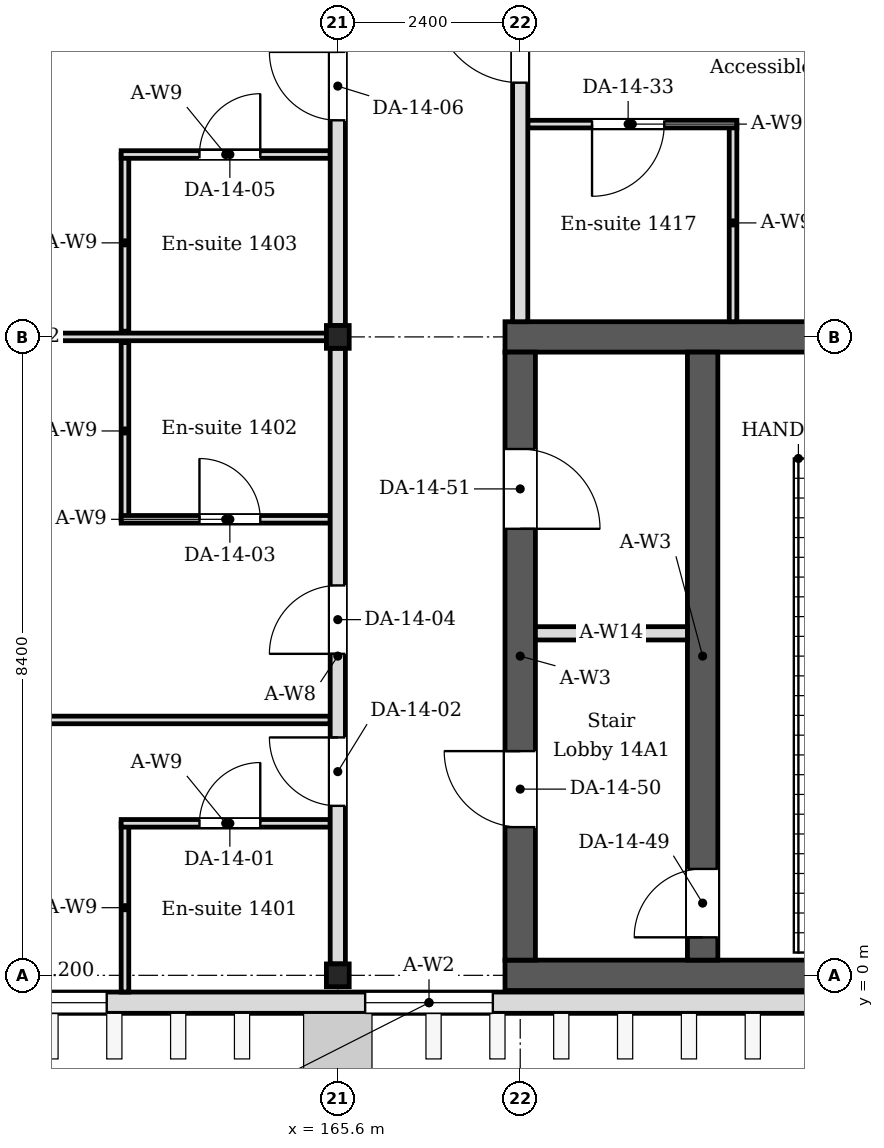
"""IFC4 building model, lengths in metres.
Left out: names, types, materials, properties, quantities, classifications, styles, units other than length and angle.
Written with IfcOpenShell. Run it as: python <this file> out.ifc"""

import sys

from ifc_helpers import new_model, si_unit, direction, frame, frame_2d, origin, origin_2d, place, context, subcontext, project, spatial, rectangle, i_section, extrude, element, fill, save


model = new_model("IFC4")
c1 = context("Model", 3, precision=1e-05, world=origin(), true_north=direction((0.0, 1.0)))
c2 = subcontext(c1, "Body", "Model", "MODEL_VIEW")
j1 = project(units=[si_unit("LENGTHUNIT", "METRE"), si_unit("PLANEANGLEUNIT", "RADIAN")], contexts=[c1])
p1 = place(None, origin())
s1 = spatial("IfcSite", under=j1, at=p1, CompositionType="ELEMENT")
p2 = place(p1, origin())
s2 = spatial("IfcBuilding", under=s1, at=p2, CompositionType="ELEMENT")
p3 = place(p2, frame((0.0, 0.0, 60.6)))
s3 = spatial("IfcBuildingStorey", under=s2, at=p3, CompositionType="ELEMENT", Elevation=60.6)
for number, where, z_axis, x_axis in (
    (1, (165.6, 0.0, 0.0), (0.0, 0.0, 1.0), (1.0, 0.0, 0.0)),
    (2, (165.6, 8.4, 0.0), (0.0, 0.0, 1.0), (1.0, 0.0, 0.0)),
):
    element("IfcColumn", number, at=place(p3, frame(where, z_axis=z_axis, x_axis=x_axis)), inside=s3, PredefinedType="COLUMN", context=c2, shape_type="SweptSolid", body=[
        extrude(i_section(OverallWidth=0.3, OverallDepth=0.3, WebThickness=0.01, FlangeThickness=0.015, FilletRadius=0.013, at=origin_2d()), origin(), (0.0, 0.0, 1.0), 4.2),
    ])
for number, where, z_axis, x_axis in (
    (3, (167.8, 0.0, 0.0), (0.0, 0.0, 1.0), (1.0, 0.0, 0.0)),
    (4, (167.8, 8.4, 0.0), (0.0, 0.0, 1.0), (1.0, 0.0, 0.0)),
):
    element("IfcWall", number, at=place(p3, frame(where, z_axis=z_axis, x_axis=x_axis)), inside=s3, PredefinedType="SOLIDWALL", context=c2, shape_type="SweptSolid", body=[
        extrude(rectangle(XDim=8.8, YDim=0.4, at=frame_2d((4.4, 0.0))), origin(), (0.0, 0.0, 1.0), 4.05),
    ])
p4 = place(p3, frame((168.0, 0.2, 0.0), z_axis=(0.0, 0.0, 1.0), x_axis=(0.0, 1.0, 0.0)))
e5 = element("IfcWall", 5, at=p4, inside=s3, PredefinedType="SOLIDWALL", context=c2, shape_type="SweptSolid", body=[
    extrude(rectangle(XDim=8.0, YDim=0.4, at=frame_2d((4.0, 0.0))), origin(), (0.0, 0.0, 1.0), 4.05),
])
p5 = place(p4, frame((1.75, 0.0, 0.0)))
e6 = element("IfcOpeningElement", 6, at=p5, cuts=e5, PredefinedType="OPENING", context=c2, shape_type="SweptSolid", body=[
    extrude(rectangle(XDim=1.0, YDim=2.1, at=frame_2d((0.5, 1.05))), frame((0.0, 0.21, 0.0), z_axis=(0.0, -1.0, 0.0), x_axis=(1.0, 0.0, 0.0)), (0.0, 0.0, 1.0), 0.42),
])
p6 = place(p4, frame((5.675, 0.0, 0.0)))
e7 = element("IfcOpeningElement", 7, at=p6, cuts=e5, PredefinedType="OPENING", context=c2, shape_type="SweptSolid", body=[
    extrude(rectangle(XDim=1.05, YDim=2.1, at=frame_2d((0.525, 1.05))), frame((0.0, 0.21, 0.0), z_axis=(0.0, -1.0, 0.0), x_axis=(1.0, 0.0, 0.0)), (0.0, 0.0, 1.0), 0.42),
])
p7 = place(p3, frame((156.7, -0.36, 0.0), z_axis=(0.0, 0.0, 1.0), x_axis=(1.0, 0.0, 0.0)))
e8 = element("IfcWall", 8, at=p7, inside=s3, PredefinedType="SOLIDWALL", context=c2, shape_type="SweptSolid", body=[
    extrude(rectangle(XDim=20.2, YDim=0.28, at=frame_2d((10.1, 0.0))), origin(), (0.0, 0.0, 1.0), 4.05),
])
p8 = place(p7, frame((9.26, 0.0, 0.6)))
e9 = element("IfcOpeningElement", 9, at=p8, cuts=e8, PredefinedType="OPENING", context=c2, shape_type="SweptSolid", body=[
    extrude(rectangle(XDim=1.68, YDim=2.4, at=frame_2d((0.84, 1.2))), frame((0.0, 0.15, 0.0), z_axis=(0.0, -1.0, 0.0), x_axis=(1.0, 0.0, 0.0)), (0.0, 0.0, 1.0), 0.3),
])
p9 = place(p7, frame((3.34, 0.0, 0.6)))
e10 = element("IfcOpeningElement", 10, at=p9, cuts=e8, PredefinedType="OPENING", context=c2, shape_type="SweptSolid", body=[
    extrude(rectangle(XDim=2.52, YDim=2.4, at=frame_2d((1.26, 1.2))), frame((0.0, 0.15, 0.0), z_axis=(0.0, -1.0, 0.0), x_axis=(1.0, 0.0, 0.0)), (0.0, 0.0, 1.0), 0.3),
])
p10 = place(p3, frame((162.8, -0.22, 0.0), z_axis=(0.0, 0.0, 1.0), x_axis=(0.0, 1.0, 0.0)))
e11 = element("IfcWall", 11, at=p10, inside=s3, PredefinedType="PARTITIONING", context=c2, shape_type="SweptSolid", body=[
    extrude(rectangle(XDim=2.22, YDim=0.1, at=frame_2d((1.11, 0.0))), origin(), (0.0, 0.0, 1.0), 4.05),
])
p11 = place(p3, frame((162.75, 2.0, 0.0), z_axis=(0.0, 0.0, 1.0), x_axis=(1.0, 0.0, 0.0)))
e12 = element("IfcWall", 12, at=p11, inside=s3, PredefinedType="PARTITIONING", context=c2, shape_type="SweptSolid", body=[
    extrude(rectangle(XDim=2.75, YDim=0.1, at=frame_2d((1.375, 0.0))), origin(), (0.0, 0.0, 1.0), 4.05),
])
p12 = place(p11, frame((1.03, 0.0, 0.0)))
e13 = element("IfcOpeningElement", 13, at=p12, cuts=e12, PredefinedType="OPENING", context=c2, shape_type="SweptSolid", body=[
    extrude(rectangle(XDim=0.8, YDim=2.1, at=frame_2d((0.4, 1.05))), frame((0.0, 0.06, 0.0), z_axis=(0.0, -1.0, 0.0), x_axis=(1.0, 0.0, 0.0)), (0.0, 0.0, 1.0), 0.12),
])
p13 = place(p3, frame((162.8, 6.0, 0.0), z_axis=(0.0, 0.0, 1.0), x_axis=(0.0, 1.0, 0.0)))
e14 = element("IfcWall", 14, at=p13, inside=s3, PredefinedType="PARTITIONING", context=c2, shape_type="SweptSolid", body=[
    extrude(rectangle(XDim=2.325, YDim=0.1, at=frame_2d((1.163, 0.0))), origin(), (0.0, 0.0, 1.0), 4.05),
])
p14 = place(p3, frame((162.75, 6.0, 0.0), z_axis=(0.0, 0.0, 1.0), x_axis=(1.0, 0.0, 0.0)))
e15 = element("IfcWall", 15, at=p14, inside=s3, PredefinedType="PARTITIONING", context=c2, shape_type="SweptSolid", body=[
    extrude(rectangle(XDim=2.75, YDim=0.1, at=frame_2d((1.375, 0.0))), origin(), (0.0, 0.0, 1.0), 4.05),
])
p15 = place(p14, frame((1.03, 0.0, 0.0)))
e16 = element("IfcOpeningElement", 16, at=p15, cuts=e15, PredefinedType="OPENING", context=c2, shape_type="SweptSolid", body=[
    extrude(rectangle(XDim=0.8, YDim=2.1, at=frame_2d((0.4, 1.05))), frame((0.0, 0.06, 0.0), z_axis=(0.0, -1.0, 0.0), x_axis=(1.0, 0.0, 0.0)), (0.0, 0.0, 1.0), 0.12),
])
p16 = place(p3, frame((162.8, 8.475, 0.0), z_axis=(0.0, 0.0, 1.0), x_axis=(0.0, 1.0, 0.0)))
e17 = element("IfcWall", 17, at=p16, inside=s3, PredefinedType="PARTITIONING", context=c2, shape_type="SweptSolid", body=[
    extrude(rectangle(XDim=2.325, YDim=0.1, at=frame_2d((1.163, 0.0))), origin(), (0.0, 0.0, 1.0), 4.05),
])
p17 = place(p3, frame((162.75, 10.8, 0.0), z_axis=(0.0, 0.0, 1.0), x_axis=(1.0, 0.0, 0.0)))
e18 = element("IfcWall", 18, at=p17, inside=s3, PredefinedType="PARTITIONING", context=c2, shape_type="SweptSolid", body=[
    extrude(rectangle(XDim=2.75, YDim=0.1, at=frame_2d((1.375, 0.0))), origin(), (0.0, 0.0, 1.0), 4.05),
])
p18 = place(p17, frame((1.03, 0.0, 0.0)))
e19 = element("IfcOpeningElement", 19, at=p18, cuts=e18, PredefinedType="OPENING", context=c2, shape_type="SweptSolid", body=[
    extrude(rectangle(XDim=0.8, YDim=2.1, at=frame_2d((0.4, 1.05))), frame((0.0, 0.06, 0.0), z_axis=(0.0, -1.0, 0.0), x_axis=(1.0, 0.0, 0.0)), (0.0, 0.0, 1.0), 0.12),
])
p19 = place(p3, frame((170.8, 8.6, 0.0), z_axis=(0.0, 0.0, 1.0), x_axis=(0.0, 1.0, 0.0)))
e20 = element("IfcWall", 20, at=p19, inside=s3, PredefinedType="PARTITIONING", context=c2, shape_type="SweptSolid", body=[
    extrude(rectangle(XDim=2.6, YDim=0.1, at=frame_2d((1.3, 0.0))), origin(), (0.0, 0.0, 1.0), 4.05),
])
p20 = place(p3, frame((170.85, 11.2, 0.0), z_axis=(0.0, 0.0, 1.0), x_axis=(-1.0, 0.0, 0.0)))
e21 = element("IfcWall", 21, at=p20, inside=s3, PredefinedType="PARTITIONING", context=c2, shape_type="SweptSolid", body=[
    extrude(rectangle(XDim=2.75, YDim=0.1, at=frame_2d((1.375, 0.0))), origin(), (0.0, 0.0, 1.0), 4.05),
])
p21 = place(p20, frame((0.955, 0.0, 0.0)))
e22 = element("IfcOpeningElement", 22, at=p21, cuts=e21, PredefinedType="OPENING", context=c2, shape_type="SweptSolid", body=[
    extrude(rectangle(XDim=0.95, YDim=2.1, at=frame_2d((0.475, 1.05))), frame((0.0, 0.06, 0.0), z_axis=(0.0, -1.0, 0.0), x_axis=(1.0, 0.0, 0.0)), (0.0, 0.0, 1.0), 0.12),
])
p22 = place(p3, frame((157.35, 8.4, 0.0), z_axis=(0.0, 0.0, 1.0), x_axis=(1.0, 0.0, 0.0)))
e23 = element("IfcWall", 23, at=p22, inside=s3, PredefinedType="PARTITIONING", context=c2, shape_type="SweptSolid", body=[
    extrude(rectangle(XDim=8.1, YDim=0.1, at=frame_2d((4.05, 0.0))), origin(), (0.0, 0.0, 1.0), 3.55),
])
p23 = place(p3, frame((156.98, 3.36, 0.0), z_axis=(0.0, 0.0, 1.0), x_axis=(1.0, 0.0, 0.0)))
e24 = element("IfcWall", 24, at=p23, inside=s3, PredefinedType="PARTITIONING", context=c2, shape_type="SweptSolid", body=[
    extrude(rectangle(XDim=8.52, YDim=0.1, at=frame_2d((4.26, 0.0))), origin(), (0.0, 0.0, 1.0), 3.55),
])
p24 = place(p3, frame((165.6, 0.15, 0.0), z_axis=(0.0, 0.0, 1.0), x_axis=(0.0, 1.0, 0.0)))
e25 = element("IfcWall", 25, at=p24, inside=s3, PredefinedType="PARTITIONING", context=c2, shape_type="SweptSolid", body=[
    extrude(rectangle(XDim=8.1, YDim=0.2, at=frame_2d((4.05, 0.0))), origin(), (0.0, 0.0, 1.0), 3.45),
])
p25 = place(p24, frame((2.08, 0.0, 0.0)))
e26 = element("IfcOpeningElement", 26, at=p25, cuts=e25, PredefinedType="OPENING", context=c2, shape_type="SweptSolid", body=[
    extrude(rectangle(XDim=0.9, YDim=2.1, at=frame_2d((0.45, 1.05))), frame((0.0, 0.11, 0.0), z_axis=(0.0, -1.0, 0.0), x_axis=(1.0, 0.0, 0.0)), (0.0, 0.0, 1.0), 0.22),
])
p26 = place(p24, frame((4.08, 0.0, 0.0)))
e27 = element("IfcOpeningElement", 27, at=p26, cuts=e25, PredefinedType="OPENING", context=c2, shape_type="SweptSolid", body=[
    extrude(rectangle(XDim=0.9, YDim=2.1, at=frame_2d((0.45, 1.05))), frame((0.0, 0.11, 0.0), z_axis=(0.0, -1.0, 0.0), x_axis=(1.0, 0.0, 0.0)), (0.0, 0.0, 1.0), 0.22),
])
p27 = place(p3, frame((165.6, 8.55, 0.0), z_axis=(0.0, 0.0, 1.0), x_axis=(0.0, 1.0, 0.0)))
e28 = element("IfcWall", 28, at=p27, inside=s3, PredefinedType="PARTITIONING", context=c2, shape_type="SweptSolid", body=[
    extrude(rectangle(XDim=8.1, YDim=0.2, at=frame_2d((4.05, 0.0))), origin(), (0.0, 0.0, 1.0), 3.45),
])
p28 = place(p27, frame((2.7, 0.0, 0.0)))
e29 = element("IfcOpeningElement", 29, at=p28, cuts=e28, PredefinedType="OPENING", context=c2, shape_type="SweptSolid", body=[
    extrude(rectangle(XDim=0.9, YDim=2.1, at=frame_2d((0.45, 1.05))), frame((0.0, 0.11, 0.0), z_axis=(0.0, -1.0, 0.0), x_axis=(1.0, 0.0, 0.0)), (0.0, 0.0, 1.0), 0.22),
])
p29 = place(p27, frame((4.5, 0.0, 0.0)))
e30 = element("IfcOpeningElement", 30, at=p29, cuts=e28, PredefinedType="OPENING", context=c2, shape_type="SweptSolid", body=[
    extrude(rectangle(XDim=0.9, YDim=2.1, at=frame_2d((0.45, 1.05))), frame((0.0, 0.11, 0.0), z_axis=(0.0, -1.0, 0.0), x_axis=(1.0, 0.0, 0.0)), (0.0, 0.0, 1.0), 0.22),
])
p30 = place(p3, frame((168.0, 8.6, 0.0), z_axis=(0.0, 0.0, 1.0), x_axis=(0.0, 1.0, 0.0)))
e31 = element("IfcWall", 31, at=p30, inside=s3, PredefinedType="PARTITIONING", context=c2, shape_type="SweptSolid", body=[
    extrude(rectangle(XDim=8.05, YDim=0.2, at=frame_2d((4.025, 0.0))), origin(), (0.0, 0.0, 1.0), 3.45),
])
p31 = place(p30, frame((3.145, 0.0, 0.0)))
e32 = element("IfcOpeningElement", 32, at=p31, cuts=e31, PredefinedType="OPENING", context=c2, shape_type="SweptSolid", body=[
    extrude(rectangle(XDim=1.15, YDim=2.1, at=frame_2d((0.575, 1.05))), frame((0.0, 0.11, 0.0), z_axis=(0.0, -1.0, 0.0), x_axis=(1.0, 0.0, 0.0)), (0.0, 0.0, 1.0), 0.22),
])
p32 = place(p30, frame((5.07, 0.0, 0.0)))
e33 = element("IfcOpeningElement", 33, at=p32, cuts=e31, PredefinedType="OPENING", context=c2, shape_type="SweptSolid", body=[
    extrude(rectangle(XDim=0.9, YDim=2.1, at=frame_2d((0.45, 1.05))), frame((0.0, 0.11, 0.0), z_axis=(0.0, -1.0, 0.0), x_axis=(1.0, 0.0, 0.0)), (0.0, 0.0, 1.0), 0.22),
])
p33 = place(p3, frame((170.4, 0.2, 0.0), z_axis=(0.0, 0.0, 1.0), x_axis=(0.0, 1.0, 0.0)))
e34 = element("IfcWall", 34, at=p33, inside=s3, PredefinedType="SOLIDWALL", context=c2, shape_type="SweptSolid", body=[
    extrude(rectangle(XDim=8.0, YDim=0.4, at=frame_2d((4.0, 0.0))), origin(), (0.0, 0.0, 1.0), 4.05),
])
p34 = place(p33, frame((0.3, 0.0, 0.0)))
e35 = element("IfcOpeningElement", 35, at=p34, cuts=e34, PredefinedType="OPENING", context=c2, shape_type="SweptSolid", body=[
    extrude(rectangle(XDim=0.9, YDim=2.1, at=frame_2d((0.45, 1.05))), frame((0.0, 0.21, 0.0), z_axis=(0.0, -1.0, 0.0), x_axis=(1.0, 0.0, 0.0)), (0.0, 0.0, 1.0), 0.42),
])
p35 = place(p3, frame((168.2, 4.5, 0.0), z_axis=(0.0, 0.0, 1.0), x_axis=(1.0, 0.0, 0.0)))
e36 = element("IfcWall", 36, at=p35, inside=s3, PredefinedType="PARTITIONING", context=c2, shape_type="SweptSolid", body=[
    extrude(rectangle(XDim=2.0, YDim=0.175, at=frame_2d((1.0, 0.0))), origin(), (0.0, 0.0, 1.0), 4.05),
])
p36 = place(p8, origin())
e37 = element("IfcWindow", 37, at=p36, inside=s3, PartitioningType="SINGLE_PANEL", PredefinedType="WINDOW", context=c2, shape_type="SweptSolid", body=[
    extrude(rectangle(XDim=1.68, YDim=2.4, at=frame_2d((0.84, 1.2))), frame((0.0, 0.03, 0.0), z_axis=(0.0, -1.0, 0.0), x_axis=(1.0, 0.0, 0.0)), (0.0, 0.0, 1.0), 0.06),
])
fill(e9, e37)
p37 = place(p9, origin())
e38 = element("IfcWindow", 38, at=p37, inside=s3, PartitioningType="SINGLE_PANEL", PredefinedType="WINDOW", context=c2, shape_type="SweptSolid", body=[
    extrude(rectangle(XDim=2.52, YDim=2.4, at=frame_2d((1.26, 1.2))), frame((0.0, 0.03, 0.0), z_axis=(0.0, -1.0, 0.0), x_axis=(1.0, 0.0, 0.0)), (0.0, 0.0, 1.0), 0.06),
])
fill(e10, e38)
p38 = place(p12, origin())
e39 = element("IfcDoor", 39, at=p38, inside=s3, OperationType="SINGLE_SWING_RIGHT", PredefinedType="DOOR", context=c2, shape_type="SweptSolid", body=[
    extrude(rectangle(XDim=0.8, YDim=2.1, at=frame_2d((0.4, 1.05))), frame((0.0, 0.025, 0.0), z_axis=(0.0, -1.0, 0.0), x_axis=(1.0, 0.0, 0.0)), (0.0, 0.0, 1.0), 0.05),
])
fill(e13, e39)
p39 = place(p25, origin())
e40 = element("IfcDoor", 40, at=p39, inside=s3, OperationType="SINGLE_SWING_RIGHT", PredefinedType="DOOR", context=c2, shape_type="SweptSolid", body=[
    extrude(rectangle(XDim=0.9, YDim=2.1, at=frame_2d((0.45, 1.05))), frame((0.0, 0.025, 0.0), z_axis=(0.0, -1.0, 0.0), x_axis=(1.0, 0.0, 0.0)), (0.0, 0.0, 1.0), 0.05),
])
fill(e26, e40)
p40 = place(p15, origin())
e41 = element("IfcDoor", 41, at=p40, inside=s3, OperationType="SINGLE_SWING_LEFT", PredefinedType="DOOR", context=c2, shape_type="SweptSolid", body=[
    extrude(rectangle(XDim=0.8, YDim=2.1, at=frame_2d((0.4, 1.05))), frame((0.0, 0.025, 0.0), z_axis=(0.0, -1.0, 0.0), x_axis=(1.0, 0.0, 0.0)), (0.0, 0.0, 1.0), 0.05),
])
fill(e16, e41)
p41 = place(p26, origin())
e42 = element("IfcDoor", 42, at=p41, inside=s3, OperationType="SINGLE_SWING_LEFT", PredefinedType="DOOR", context=c2, shape_type="SweptSolid", body=[
    extrude(rectangle(XDim=0.9, YDim=2.1, at=frame_2d((0.45, 1.05))), frame((0.0, 0.025, 0.0), z_axis=(0.0, -1.0, 0.0), x_axis=(1.0, 0.0, 0.0)), (0.0, 0.0, 1.0), 0.05),
])
fill(e27, e42)
p42 = place(p18, origin())
e43 = element("IfcDoor", 43, at=p42, inside=s3, OperationType="SINGLE_SWING_RIGHT", PredefinedType="DOOR", context=c2, shape_type="SweptSolid", body=[
    extrude(rectangle(XDim=0.8, YDim=2.1, at=frame_2d((0.4, 1.05))), frame((0.0, 0.025, 0.0), z_axis=(0.0, -1.0, 0.0), x_axis=(1.0, 0.0, 0.0)), (0.0, 0.0, 1.0), 0.05),
])
fill(e19, e43)
p43 = place(p28, origin())
e44 = element("IfcDoor", 44, at=p43, inside=s3, OperationType="SINGLE_SWING_RIGHT", PredefinedType="DOOR", context=c2, shape_type="SweptSolid", body=[
    extrude(rectangle(XDim=0.9, YDim=2.1, at=frame_2d((0.45, 1.05))), frame((0.0, 0.025, 0.0), z_axis=(0.0, -1.0, 0.0), x_axis=(1.0, 0.0, 0.0)), (0.0, 0.0, 1.0), 0.05),
])
fill(e29, e44)
p44 = place(p21, origin())
e45 = element("IfcDoor", 45, at=p44, inside=s3, OperationType="SINGLE_SWING_RIGHT", PredefinedType="DOOR", context=c2, shape_type="SweptSolid", body=[
    extrude(rectangle(XDim=0.95, YDim=2.1, at=frame_2d((0.475, 1.05))), frame((0.0, 0.025, 0.0), z_axis=(0.0, -1.0, 0.0), x_axis=(1.0, 0.0, 0.0)), (0.0, 0.0, 1.0), 0.05),
])
fill(e22, e45)
p45 = place(p31, origin())
e46 = element("IfcDoor", 46, at=p45, inside=s3, OperationType="SINGLE_SWING_RIGHT", PredefinedType="DOOR", context=c2, shape_type="SweptSolid", body=[
    extrude(rectangle(XDim=1.15, YDim=2.1, at=frame_2d((0.575, 1.05))), frame((0.0, 0.025, 0.0), z_axis=(0.0, -1.0, 0.0), x_axis=(1.0, 0.0, 0.0)), (0.0, 0.0, 1.0), 0.05),
])
fill(e32, e46)
p46 = place(p34, origin())
e47 = element("IfcDoor", 47, at=p46, inside=s3, OperationType="SINGLE_SWING_LEFT", PredefinedType="DOOR", context=c2, shape_type="SweptSolid", body=[
    extrude(rectangle(XDim=0.9, YDim=2.1, at=frame_2d((0.45, 1.05))), frame((0.0, 0.025, 0.0), z_axis=(0.0, -1.0, 0.0), x_axis=(1.0, 0.0, 0.0)), (0.0, 0.0, 1.0), 0.05),
])
fill(e35, e47)
p47 = place(p5, origin())
e48 = element("IfcDoor", 48, at=p47, inside=s3, OperationType="SINGLE_SWING_RIGHT", PredefinedType="DOOR", context=c2, shape_type="SweptSolid", body=[
    extrude(rectangle(XDim=1.0, YDim=2.1, at=frame_2d((0.5, 1.05))), frame((0.0, 0.025, 0.0), z_axis=(0.0, -1.0, 0.0), x_axis=(1.0, 0.0, 0.0)), (0.0, 0.0, 1.0), 0.05),
])
fill(e6, e48)
p48 = place(p6, origin())
e49 = element("IfcDoor", 49, at=p48, inside=s3, OperationType="SINGLE_SWING_LEFT", PredefinedType="DOOR", context=c2, shape_type="SweptSolid", body=[
    extrude(rectangle(XDim=1.05, YDim=2.1, at=frame_2d((0.525, 1.05))), frame((0.0, 0.025, 0.0), z_axis=(0.0, -1.0, 0.0), x_axis=(1.0, 0.0, 0.0)), (0.0, 0.0, 1.0), 0.05),
])
fill(e7, e49)
save(model, sys.argv[1])
